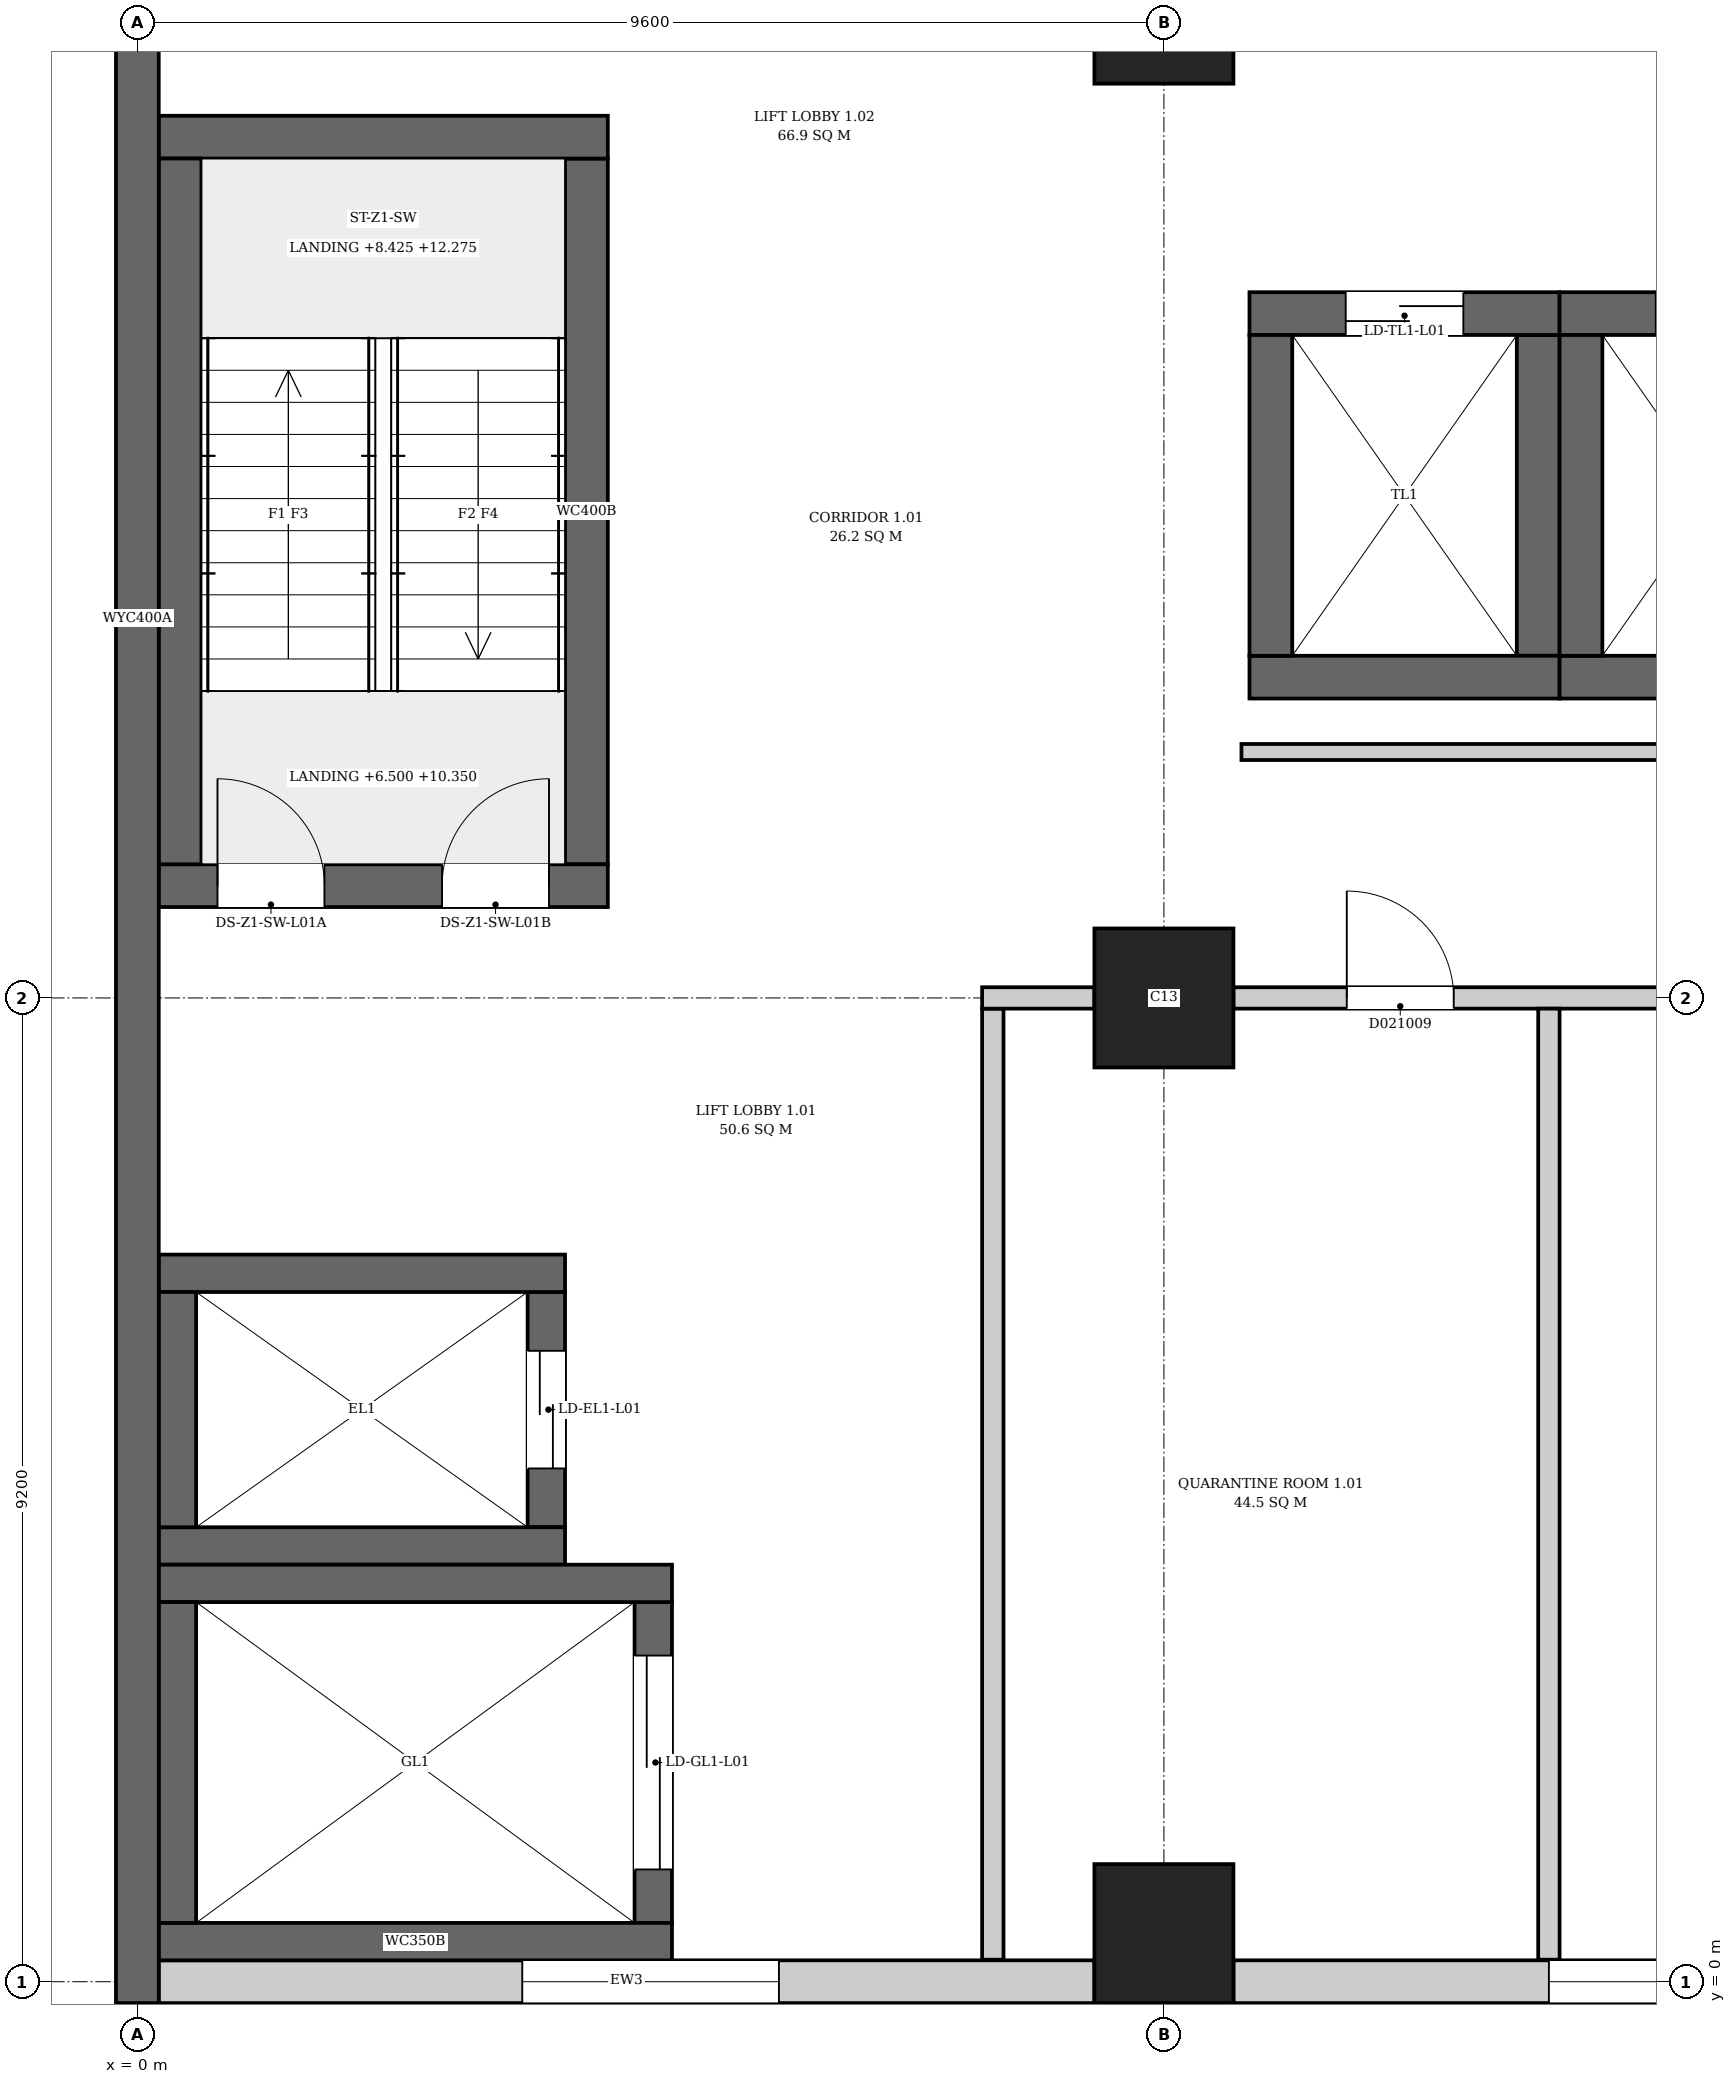
"""IFC4 building model, lengths in metres.
Left out: names, types, materials, properties, quantities, classifications, styles, units other than length and angle.
Written with IfcOpenShell. Run it as: python <this file> out.ifc"""

import sys

from ifc_helpers import new_model, si_unit, direction, frame, frame_2d, origin, origin_2d, place, context, subcontext, project, spatial, rectangle, extrude, element, fill, save


model = new_model("IFC4")
c1 = context("Model", 3, precision=1e-05, world=origin(), true_north=direction((0.0, 1.0)))
c2 = subcontext(c1, "Body", "Model", "MODEL_VIEW")
j1 = project(units=[si_unit("LENGTHUNIT", "METRE"), si_unit("PLANEANGLEUNIT", "RADIAN")], contexts=[c1])
p1 = place(None, origin())
s1 = spatial("IfcSite", under=j1, at=p1, CompositionType="ELEMENT")
p2 = place(p1, origin())
s2 = spatial("IfcBuilding", under=s1, at=p2, CompositionType="ELEMENT")
p3 = place(p2, frame((0.0, 0.0, 6.5)))
s3 = spatial("IfcBuildingStorey", under=s2, at=p3, CompositionType="ELEMENT", Elevation=6.5)
p4 = place(p3, frame((0.0, -0.2, 0.0), z_axis=(0.0, 0.0, 1.0), x_axis=(0.0, 1.0, 0.0)))
e1 = element("IfcWall", 1, at=p4, inside=s3, PredefinedType="SHEAR", context=c2, shape_type="SweptSolid", body=[
    extrude(rectangle(XDim=46.88, YDim=0.4, at=frame_2d((23.44, 0.0))), origin(), (0.0, 0.0, 1.0), 7.7),
])
p5 = place(p3, frame((0.2, 10.25, 0.0), z_axis=(0.0, 0.0, 1.0), x_axis=(1.0, 0.0, 0.0)))
e2 = element("IfcWall", 2, at=p5, inside=s3, PredefinedType="SHEAR", context=c2, shape_type="SweptSolid", body=[
    extrude(rectangle(XDim=4.2, YDim=0.4, at=frame_2d((2.1, 0.0))), origin(), (0.0, 0.0, 1.0), 7.7),
])
p6 = place(p5, frame((0.55, 0.0, 0.0)))
e3 = element("IfcOpeningElement", 3, at=p6, cuts=e2, PredefinedType="OPENING", context=c2, shape_type="SweptSolid", body=[
    extrude(rectangle(XDim=1.0, YDim=2.1, at=frame_2d((0.5, 1.05))), frame((0.0, 0.21, 0.0), z_axis=(0.0, -1.0, 0.0), x_axis=(1.0, 0.0, 0.0)), (0.0, 0.0, 1.0), 0.42),
])
p7 = place(p5, frame((2.65, 0.0, 0.0)))
e4 = element("IfcOpeningElement", 4, at=p7, cuts=e2, PredefinedType="OPENING", context=c2, shape_type="SweptSolid", body=[
    extrude(rectangle(XDim=1.0, YDim=2.1, at=frame_2d((0.5, 1.05))), frame((0.0, 0.21, 0.0), z_axis=(0.0, -1.0, 0.0), x_axis=(1.0, 0.0, 0.0)), (0.0, 0.0, 1.0), 0.42),
])
p8 = place(p3, frame((0.2, 17.25, 0.0), z_axis=(0.0, 0.0, 1.0), x_axis=(1.0, 0.0, 0.0)))
e5 = element("IfcWall", 5, at=p8, inside=s3, PredefinedType="SHEAR", context=c2, shape_type="SweptSolid", body=[
    extrude(rectangle(XDim=4.2, YDim=0.4, at=frame_2d((2.1, 0.0))), origin(), (0.0, 0.0, 1.0), 7.7),
])
for number, where, z_axis, x_axis in (
    (6, (0.4, 10.45, 0.0), (0.0, 0.0, 1.0), (0.0, 1.0, 0.0)),
    (7, (4.2, 10.45, 0.0), (0.0, 0.0, 1.0), (0.0, 1.0, 0.0)),
):
    element("IfcWall", number, at=place(p3, frame(where, z_axis=z_axis, x_axis=x_axis)), inside=s3, PredefinedType="SHEAR", context=c2, shape_type="SweptSolid", body=[
        extrude(rectangle(XDim=6.6, YDim=0.4, at=frame_2d((3.3, 0.0))), origin(), (0.0, 0.0, 1.0), 7.7),
    ])
for number, where, z_axis, x_axis in (
    (8, (0.2, 0.375, 0.0), (0.0, 0.0, 1.0), (1.0, 0.0, 0.0)),
    (9, (0.2, 3.725, 0.0), (0.0, 0.0, 1.0), (1.0, 0.0, 0.0)),
):
    element("IfcWall", number, at=place(p3, frame(where, z_axis=z_axis, x_axis=x_axis)), inside=s3, PredefinedType="SHEAR", context=c2, shape_type="SweptSolid", body=[
        extrude(rectangle(XDim=4.8, YDim=0.35, at=frame_2d((2.4, 0.0))), origin(), (0.0, 0.0, 1.0), 7.7),
    ])
p9 = place(p3, frame((0.375, 0.55, 0.0), z_axis=(0.0, 0.0, 1.0), x_axis=(0.0, 1.0, 0.0)))
e10 = element("IfcWall", 10, at=p9, inside=s3, PredefinedType="SHEAR", context=c2, shape_type="SweptSolid", body=[
    extrude(rectangle(XDim=3.0, YDim=0.35, at=frame_2d((1.5, 0.0))), origin(), (0.0, 0.0, 1.0), 7.7),
])
p10 = place(p3, frame((4.825, 0.55, 0.0), z_axis=(0.0, 0.0, 1.0), x_axis=(0.0, 1.0, 0.0)))
e11 = element("IfcWall", 11, at=p10, inside=s3, PredefinedType="SHEAR", context=c2, shape_type="SweptSolid", body=[
    extrude(rectangle(XDim=3.0, YDim=0.35, at=frame_2d((1.5, 0.0))), origin(), (0.0, 0.0, 1.0), 7.7),
])
p11 = place(p10, frame((0.5, 0.0, 0.0)))
e12 = element("IfcOpeningElement", 12, at=p11, cuts=e11, PredefinedType="OPENING", context=c2, shape_type="SweptSolid", body=[
    extrude(rectangle(XDim=2.0, YDim=2.4, at=frame_2d((1.0, 1.2))), frame((0.0, 0.185, 0.0), z_axis=(0.0, -1.0, 0.0), x_axis=(1.0, 0.0, 0.0)), (0.0, 0.0, 1.0), 0.37),
])
for number, where, z_axis, x_axis in (
    (13, (0.2, 4.075, 0.0), (0.0, 0.0, 1.0), (1.0, 0.0, 0.0)),
    (14, (0.2, 6.625, 0.0), (0.0, 0.0, 1.0), (1.0, 0.0, 0.0)),
):
    element("IfcWall", number, at=place(p3, frame(where, z_axis=z_axis, x_axis=x_axis)), inside=s3, PredefinedType="SHEAR", context=c2, shape_type="SweptSolid", body=[
        extrude(rectangle(XDim=3.8, YDim=0.35, at=frame_2d((1.9, 0.0))), origin(), (0.0, 0.0, 1.0), 7.7),
    ])
p12 = place(p3, frame((0.375, 4.25, 0.0), z_axis=(0.0, 0.0, 1.0), x_axis=(0.0, 1.0, 0.0)))
e15 = element("IfcWall", 15, at=p12, inside=s3, PredefinedType="SHEAR", context=c2, shape_type="SweptSolid", body=[
    extrude(rectangle(XDim=2.2, YDim=0.35, at=frame_2d((1.1, 0.0))), origin(), (0.0, 0.0, 1.0), 7.7),
])
p13 = place(p3, frame((3.825, 4.25, 0.0), z_axis=(0.0, 0.0, 1.0), x_axis=(0.0, 1.0, 0.0)))
e16 = element("IfcWall", 16, at=p13, inside=s3, PredefinedType="SHEAR", context=c2, shape_type="SweptSolid", body=[
    extrude(rectangle(XDim=2.2, YDim=0.35, at=frame_2d((1.1, 0.0))), origin(), (0.0, 0.0, 1.0), 7.7),
])
p14 = place(p13, frame((0.55, 0.0, 0.0)))
e17 = element("IfcOpeningElement", 17, at=p14, cuts=e16, PredefinedType="OPENING", context=c2, shape_type="SweptSolid", body=[
    extrude(rectangle(XDim=1.1, YDim=2.1, at=frame_2d((0.55, 1.05))), frame((0.0, 0.185, 0.0), z_axis=(0.0, -1.0, 0.0), x_axis=(1.0, 0.0, 0.0)), (0.0, 0.0, 1.0), 0.37),
])
p15 = place(p3, frame((10.4, 12.2, 0.0), z_axis=(0.0, 0.0, 1.0), x_axis=(1.0, 0.0, 0.0)))
e18 = element("IfcWall", 18, at=p15, inside=s3, PredefinedType="SHEAR", context=c2, shape_type="SweptSolid", body=[
    extrude(rectangle(XDim=2.9, YDim=0.4, at=frame_2d((1.45, 0.0))), origin(), (0.0, 0.0, 1.0), 7.7),
])
p16 = place(p3, frame((10.4, 15.6, 0.0), z_axis=(0.0, 0.0, 1.0), x_axis=(1.0, 0.0, 0.0)))
e19 = element("IfcWall", 19, at=p16, inside=s3, PredefinedType="SHEAR", context=c2, shape_type="SweptSolid", body=[
    extrude(rectangle(XDim=2.9, YDim=0.4, at=frame_2d((1.45, 0.0))), origin(), (0.0, 0.0, 1.0), 7.7),
])
p17 = place(p16, frame((0.9, 0.0, 0.0)))
e20 = element("IfcOpeningElement", 20, at=p17, cuts=e19, PredefinedType="OPENING", context=c2, shape_type="SweptSolid", body=[
    extrude(rectangle(XDim=1.1, YDim=2.1, at=frame_2d((0.55, 1.05))), frame((0.0, 0.21, 0.0), z_axis=(0.0, -1.0, 0.0), x_axis=(1.0, 0.0, 0.0)), (0.0, 0.0, 1.0), 0.42),
])
for number, where, z_axis, x_axis in (
    (21, (10.6, 12.4, 0.0), (0.0, 0.0, 1.0), (0.0, 1.0, 0.0)),
    (22, (13.1, 12.4, 0.0), (0.0, 0.0, 1.0), (0.0, 1.0, 0.0)),
):
    element("IfcWall", number, at=place(p3, frame(where, z_axis=z_axis, x_axis=x_axis)), inside=s3, PredefinedType="SHEAR", context=c2, shape_type="SweptSolid", body=[
        extrude(rectangle(XDim=3.0, YDim=0.4, at=frame_2d((1.5, 0.0))), origin(), (0.0, 0.0, 1.0), 7.7),
    ])
p18 = place(p3, frame((13.3, 12.2, 0.0), z_axis=(0.0, 0.0, 1.0), x_axis=(1.0, 0.0, 0.0)))
e23 = element("IfcWall", 23, at=p18, inside=s3, PredefinedType="SHEAR", context=c2, shape_type="SweptSolid", body=[
    extrude(rectangle(XDim=2.9, YDim=0.4, at=frame_2d((1.45, 0.0))), origin(), (0.0, 0.0, 1.0), 7.7),
])
p19 = place(p3, frame((13.3, 15.6, 0.0), z_axis=(0.0, 0.0, 1.0), x_axis=(1.0, 0.0, 0.0)))
e24 = element("IfcWall", 24, at=p19, inside=s3, PredefinedType="SHEAR", context=c2, shape_type="SweptSolid", body=[
    extrude(rectangle(XDim=2.9, YDim=0.4, at=frame_2d((1.45, 0.0))), origin(), (0.0, 0.0, 1.0), 7.7),
])
p20 = place(p19, frame((0.9, 0.0, 0.0)))
e25 = element("IfcOpeningElement", 25, at=p20, cuts=e24, PredefinedType="OPENING", context=c2, shape_type="SweptSolid", body=[
    extrude(rectangle(XDim=1.1, YDim=2.1, at=frame_2d((0.55, 1.05))), frame((0.0, 0.21, 0.0), z_axis=(0.0, -1.0, 0.0), x_axis=(1.0, 0.0, 0.0)), (0.0, 0.0, 1.0), 0.42),
])
p21 = place(p3, frame((13.5, 12.4, 0.0), z_axis=(0.0, 0.0, 1.0), x_axis=(0.0, 1.0, 0.0)))
e26 = element("IfcWall", 26, at=p21, inside=s3, PredefinedType="SHEAR", context=c2, shape_type="SweptSolid", body=[
    extrude(rectangle(XDim=3.0, YDim=0.4, at=frame_2d((1.5, 0.0))), origin(), (0.0, 0.0, 1.0), 7.7),
])
for number, where, z_axis, x_axis in (
    (27, (9.6, 0.45, 0.0), (0.0, 0.0, 1.0), (1.0, 0.0, 0.0)),
    (28, (9.6, 9.2, 0.0), (0.0, 0.0, 1.0), (1.0, 0.0, 0.0)),
    (29, (9.6, 18.4, 0.0), (0.0, 0.0, 1.0), (1.0, 0.0, 0.0)),
):
    element("IfcColumn", number, at=place(p3, frame(where, z_axis=z_axis, x_axis=x_axis)), inside=s3, PredefinedType="COLUMN", context=c2, shape_type="SweptSolid", body=[
        extrude(rectangle(XDim=1.3, YDim=1.3, at=origin_2d()), origin(), (0.0, 0.0, 1.0), 7.7),
    ])
p22 = place(p3, frame((0.2, 0.0, 0.0), z_axis=(0.0, 0.0, 1.0), x_axis=(1.0, 0.0, 0.0)))
e30 = element("IfcWall", 30, at=p22, inside=s3, PredefinedType="ELEMENTEDWALL", context=c2, shape_type="SweptSolid", body=[
    extrude(rectangle(XDim=8.75, YDim=0.4, at=frame_2d((4.375, 0.0))), origin(), (0.0, 0.0, 1.0), 7.35),
])
p23 = place(p22, frame((3.4, 0.0, 1.0)))
e31 = element("IfcOpeningElement", 31, at=p23, cuts=e30, PredefinedType="OPENING", context=c2, shape_type="SweptSolid", body=[
    extrude(rectangle(XDim=2.4, YDim=2.2, at=frame_2d((1.2, 1.1))), frame((0.0, 0.21, 0.0), z_axis=(0.0, -1.0, 0.0), x_axis=(1.0, 0.0, 0.0)), (0.0, 0.0, 1.0), 0.42),
])
p24 = place(p3, frame((10.25, 0.0, 0.0), z_axis=(0.0, 0.0, 1.0), x_axis=(1.0, 0.0, 0.0)))
e32 = element("IfcWall", 32, at=p24, inside=s3, PredefinedType="ELEMENTEDWALL", context=c2, shape_type="SweptSolid", body=[
    extrude(rectangle(XDim=8.3, YDim=0.4, at=frame_2d((4.15, 0.0))), origin(), (0.0, 0.0, 1.0), 7.35),
])
p25 = place(p24, frame((2.95, 0.0, 1.0)))
e33 = element("IfcOpeningElement", 33, at=p25, cuts=e32, PredefinedType="OPENING", context=c2, shape_type="SweptSolid", body=[
    extrude(rectangle(XDim=2.4, YDim=2.2, at=frame_2d((1.2, 1.1))), frame((0.0, 0.21, 0.0), z_axis=(0.0, -1.0, 0.0), x_axis=(1.0, 0.0, 0.0)), (0.0, 0.0, 1.0), 0.42),
])
p26 = place(p3, frame((8.0, 0.206, 0.0), z_axis=(0.0, 0.0, 1.0), x_axis=(0.0, 1.0, 0.0)))
e34 = element("IfcWall", 34, at=p26, inside=s3, PredefinedType="PARTITIONING", context=c2, shape_type="SweptSolid", body=[
    extrude(rectangle(XDim=8.894, YDim=0.2, at=frame_2d((4.447, 0.0))), origin(), (0.0, 0.0, 1.0), 7.35),
])
p27 = place(p3, frame((7.9, 9.2, 0.0), z_axis=(0.0, 0.0, 1.0), x_axis=(1.0, 0.0, 0.0)))
e35 = element("IfcWall", 35, at=p27, inside=s3, PredefinedType="PARTITIONING", context=c2, shape_type="SweptSolid", body=[
    extrude(rectangle(XDim=1.05, YDim=0.2, at=frame_2d((0.525, 0.0))), origin(), (0.0, 0.0, 1.0), 6.95),
])
p28 = place(p3, frame((10.25, 9.2, 0.0), z_axis=(0.0, 0.0, 1.0), x_axis=(1.0, 0.0, 0.0)))
e36 = element("IfcWall", 36, at=p28, inside=s3, PredefinedType="PARTITIONING", context=c2, shape_type="SweptSolid", body=[
    extrude(rectangle(XDim=8.3, YDim=0.2, at=frame_2d((4.15, 0.0))), origin(), (0.0, 0.0, 1.0), 6.95),
])
p29 = place(p28, frame((1.06, 0.0, 0.0)))
e37 = element("IfcOpeningElement", 37, at=p29, cuts=e36, PredefinedType="OPENING", context=c2, shape_type="SweptSolid", body=[
    extrude(rectangle(XDim=1.0, YDim=2.1, at=frame_2d((0.5, 1.05))), frame((0.0, 0.11, 0.0), z_axis=(0.0, -1.0, 0.0), x_axis=(1.0, 0.0, 0.0)), (0.0, 0.0, 1.0), 0.22),
])
p30 = place(p28, frame((5.04, 0.0, 0.0)))
e38 = element("IfcOpeningElement", 38, at=p30, cuts=e36, PredefinedType="OPENING", context=c2, shape_type="SweptSolid", body=[
    extrude(rectangle(XDim=1.0, YDim=2.1, at=frame_2d((0.5, 1.05))), frame((0.0, 0.11, 0.0), z_axis=(0.0, -1.0, 0.0), x_axis=(1.0, 0.0, 0.0)), (0.0, 0.0, 1.0), 0.22),
])
p31 = place(p3, frame((10.325, 11.5, 0.0), z_axis=(0.0, 0.0, 1.0), x_axis=(1.0, 0.0, 0.0)))
e39 = element("IfcWall", 39, at=p31, inside=s3, PredefinedType="PARTITIONING", context=c2, shape_type="SweptSolid", body=[
    extrude(rectangle(XDim=9.569, YDim=0.15, at=frame_2d((4.785, 0.0))), origin(), (0.0, 0.0, 1.0), 7.35),
])
p32 = place(p3, frame((13.2, 0.206, 0.0), z_axis=(0.0, 0.0, 1.0), x_axis=(0.0, 1.0, 0.0)))
e40 = element("IfcWall", 40, at=p32, inside=s3, PredefinedType="PARTITIONING", context=c2, shape_type="SweptSolid", body=[
    extrude(rectangle(XDim=8.894, YDim=0.2, at=frame_2d((4.447, 0.0))), origin(), (0.0, 0.0, 1.0), 7.35),
])
p33 = place(p23, origin())
e41 = element("IfcWindow", 41, at=p33, inside=s3, PartitioningType="SINGLE_PANEL", PredefinedType="WINDOW", context=c2, shape_type="SweptSolid", body=[
    extrude(rectangle(XDim=2.4, YDim=2.2, at=frame_2d((1.2, 1.1))), frame((0.0, 0.03, 0.0), z_axis=(0.0, -1.0, 0.0), x_axis=(1.0, 0.0, 0.0)), (0.0, 0.0, 1.0), 0.06),
])
fill(e31, e41)
p34 = place(p25, origin())
e42 = element("IfcWindow", 42, at=p34, inside=s3, PartitioningType="SINGLE_PANEL", PredefinedType="WINDOW", context=c2, shape_type="SweptSolid", body=[
    extrude(rectangle(XDim=2.4, YDim=2.2, at=frame_2d((1.2, 1.1))), frame((0.0, 0.03, 0.0), z_axis=(0.0, -1.0, 0.0), x_axis=(1.0, 0.0, 0.0)), (0.0, 0.0, 1.0), 0.06),
])
fill(e33, e42)
p35 = place(p6, origin())
e43 = element("IfcDoor", 43, at=p35, inside=s3, OperationType="SINGLE_SWING_RIGHT", PredefinedType="DOOR", context=c2, shape_type="SweptSolid", body=[
    extrude(rectangle(XDim=1.0, YDim=2.1, at=frame_2d((0.5, 1.05))), frame((0.0, 0.025, 0.0), z_axis=(0.0, -1.0, 0.0), x_axis=(1.0, 0.0, 0.0)), (0.0, 0.0, 1.0), 0.05),
])
fill(e3, e43)
p36 = place(p7, origin())
e44 = element("IfcDoor", 44, at=p36, inside=s3, OperationType="SINGLE_SWING_LEFT", PredefinedType="DOOR", context=c2, shape_type="SweptSolid", body=[
    extrude(rectangle(XDim=1.0, YDim=2.1, at=frame_2d((0.5, 1.05))), frame((0.0, 0.025, 0.0), z_axis=(0.0, -1.0, 0.0), x_axis=(1.0, 0.0, 0.0)), (0.0, 0.0, 1.0), 0.05),
])
fill(e4, e44)
p37 = place(p11, origin())
e45 = element("IfcDoor", 45, at=p37, inside=s3, OperationType="DOUBLE_DOOR_SLIDING", PredefinedType="DOOR", context=c2, shape_type="SweptSolid", body=[
    extrude(rectangle(XDim=2.0, YDim=2.4, at=frame_2d((1.0, 1.2))), frame((0.0, 0.025, 0.0), z_axis=(0.0, -1.0, 0.0), x_axis=(1.0, 0.0, 0.0)), (0.0, 0.0, 1.0), 0.05),
])
fill(e12, e45)
p38 = place(p14, origin())
e46 = element("IfcDoor", 46, at=p38, inside=s3, OperationType="DOUBLE_DOOR_SLIDING", PredefinedType="DOOR", context=c2, shape_type="SweptSolid", body=[
    extrude(rectangle(XDim=1.1, YDim=2.1, at=frame_2d((0.55, 1.05))), frame((0.0, 0.025, 0.0), z_axis=(0.0, -1.0, 0.0), x_axis=(1.0, 0.0, 0.0)), (0.0, 0.0, 1.0), 0.05),
])
fill(e17, e46)
p39 = place(p17, origin())
e47 = element("IfcDoor", 47, at=p39, inside=s3, OperationType="DOUBLE_DOOR_SLIDING", PredefinedType="DOOR", context=c2, shape_type="SweptSolid", body=[
    extrude(rectangle(XDim=1.1, YDim=2.1, at=frame_2d((0.55, 1.05))), frame((0.0, 0.025, 0.0), z_axis=(0.0, -1.0, 0.0), x_axis=(1.0, 0.0, 0.0)), (0.0, 0.0, 1.0), 0.05),
])
fill(e20, e47)
p40 = place(p29, origin())
e48 = element("IfcDoor", 48, at=p40, inside=s3, OperationType="SINGLE_SWING_LEFT", PredefinedType="DOOR", context=c2, shape_type="SweptSolid", body=[
    extrude(rectangle(XDim=1.0, YDim=2.1, at=frame_2d((0.5, 1.05))), frame((0.0, 0.025, 0.0), z_axis=(0.0, -1.0, 0.0), x_axis=(1.0, 0.0, 0.0)), (0.0, 0.0, 1.0), 0.05),
])
fill(e37, e48)
save(model, sys.argv[1])
